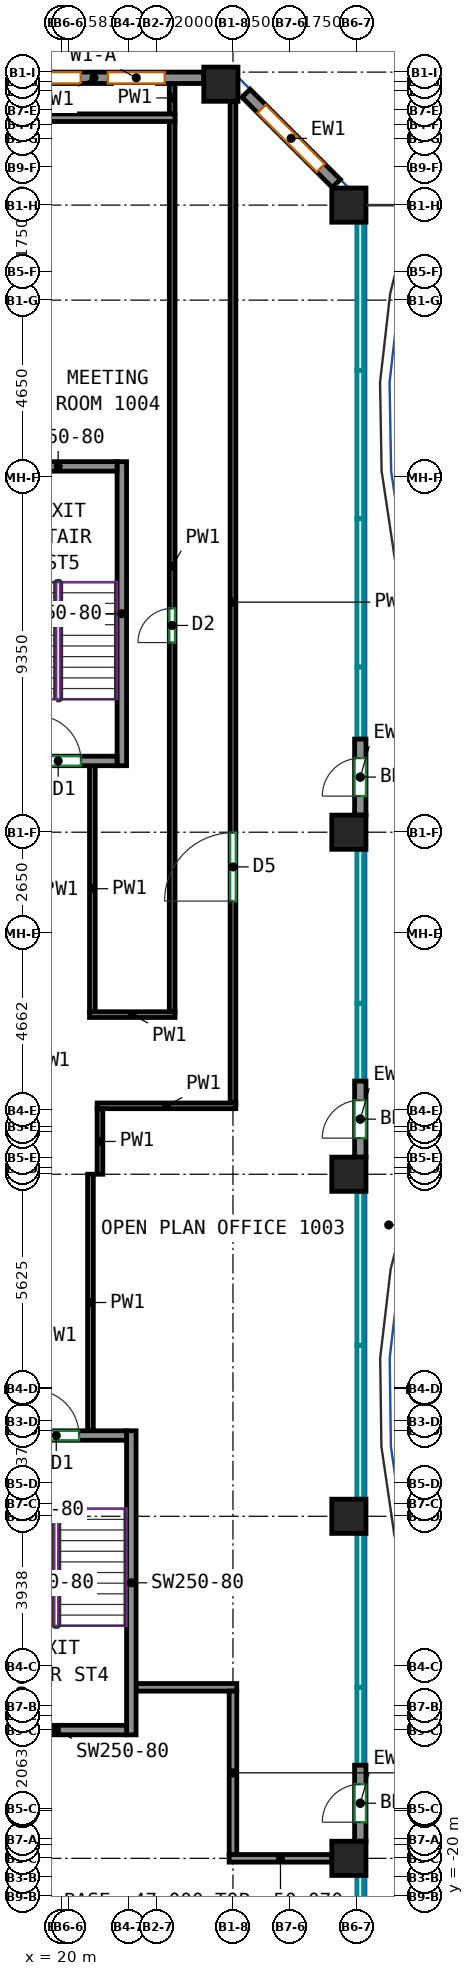
"""IFC4 building model, lengths in metres.
Left out: names, types, materials, properties, quantities, classifications, styles, units other than length and angle.
Written with IfcOpenShell. Run it as: python <this file> out.ifc"""

import sys

from ifc_helpers import new_model, si_unit, direction, frame, frame_2d, origin, origin_2d, place, context, subcontext, project, spatial, rectangle, extrude, source, transform, mapped, element, fill, save


model = new_model("IFC4")
c1 = context("Model", 3, precision=1e-05, world=origin(), true_north=direction((0.0, 1.0)))
c2 = subcontext(c1, "Body", "Model", "MODEL_VIEW")
j1 = project(units=[si_unit("LENGTHUNIT", "METRE"), si_unit("PLANEANGLEUNIT", "RADIAN")], contexts=[c1])
p1 = place(None, origin())
s1 = spatial("IfcSite", under=j1, at=p1, CompositionType="ELEMENT")
p2 = place(p1, origin())
s2 = spatial("IfcBuilding", under=s1, at=p2, CompositionType="ELEMENT")
p3 = place(p2, frame((0.0, 0.0, 47.0)))
s3 = spatial("IfcBuildingStorey", under=s2, at=p3, CompositionType="ELEMENT", Elevation=47.0)
m1 = source(origin(), c2, "Body", "SweptSolid", [
    extrude(rectangle(XDim=0.9, YDim=0.9, at=origin_2d()), origin(), (0.0, 0.0, 1.0), 3.72),
])
for number, where, z_axis, x_axis in (
    (1, (24.182, 27.682, 0.0), (0.0, 0.0, 1.0), (1.0, 0.0, 0.0)),
    (2, (27.55, -19.0, 0.0), (0.0, 0.0, 1.0), (1.0, 0.0, 0.0)),
    (3, (27.55, -10.0, 0.0), (0.0, 0.0, 1.0), (1.0, 0.0, 0.0)),
    (4, (27.55, -1.0, 0.0), (0.0, 0.0, 1.0), (1.0, 0.0, 0.0)),
    (5, (27.55, 8.0, 0.0), (0.0, 0.0, 1.0), (1.0, 0.0, 0.0)),
    (6, (27.55, 24.5, 0.0), (0.0, 0.0, 1.0), (1.0, 0.0, 0.0)),
):
    element("IfcColumn", number, at=place(p3, frame(where, z_axis=z_axis, x_axis=x_axis)), inside=s3, PredefinedType="COLUMN", context=c2, shape_type="MappedRepresentation", body=[
        mapped(m1, transform((0.0, 0.0, 0.0))),
    ])
m2 = source(origin(), c2, "Body", "SweptSolid", [
    extrude(rectangle(XDim=8.0, YDim=0.25, at=frame_2d((4.0, 0.0))), origin(), (0.0, 0.0, 1.0), 3.72),
])
p4 = place(p3, frame((21.825, -15.75, 0.0), z_axis=(0.0, 0.0, 1.0), x_axis=(0.0, 1.0, 0.0)))
e7 = element("IfcWall", 7, at=p4, inside=s3, PredefinedType="SHEAR", context=c2, shape_type="MappedRepresentation", body=[
    mapped(m2, transform((0.0, 0.0, 0.0))),
])
m3 = source(origin(), c2, "Body", "SweptSolid", [
    extrude(rectangle(XDim=3.7, YDim=0.25, at=frame_2d((1.85, 0.0))), origin(), (0.0, 0.0, 1.0), 3.72),
])
p5 = place(p3, frame((18.0, -15.625, 0.0), z_axis=(0.0, 0.0, 1.0), x_axis=(1.0, 0.0, 0.0)))
e8 = element("IfcWall", 8, at=p5, inside=s3, PredefinedType="SHEAR", context=c2, shape_type="MappedRepresentation", body=[
    mapped(m3, transform((0.0, 0.0, 0.0))),
])
p6 = place(p3, frame((18.0, -7.875, 0.0), z_axis=(0.0, 0.0, 1.0), x_axis=(1.0, 0.0, 0.0)))
e9 = element("IfcWall", 9, at=p6, inside=s3, PredefinedType="SHEAR", context=c2, shape_type="MappedRepresentation", body=[
    mapped(m3, transform((0.0, 0.0, 0.0))),
])
p7 = place(p6, frame((1.25, 0.0, 0.0)))
e10 = element("IfcOpeningElement", 10, at=p7, cuts=e9, PredefinedType="OPENING", context=c2, shape_type="SweptSolid", body=[
    extrude(rectangle(XDim=1.2, YDim=2.1, at=frame_2d((0.6, 1.05))), frame((0.0, 0.135, 0.0), z_axis=(0.0, -1.0, 0.0), x_axis=(1.0, 0.0, 0.0)), (0.0, 0.0, 1.0), 0.27),
])
p8 = place(p3, frame((21.575, 9.75, 0.0), z_axis=(0.0, 0.0, 1.0), x_axis=(0.0, 1.0, 0.0)))
e11 = element("IfcWall", 11, at=p8, inside=s3, PredefinedType="SHEAR", context=c2, shape_type="MappedRepresentation", body=[
    mapped(m2, transform((0.0, 0.0, 0.0))),
])
m4 = source(origin(), c2, "Body", "SweptSolid", [
    extrude(rectangle(XDim=3.1, YDim=0.25, at=frame_2d((1.55, 0.0))), origin(), (0.0, 0.0, 1.0), 3.72),
])
p9 = place(p3, frame((18.35, 9.875, 0.0), z_axis=(0.0, 0.0, 1.0), x_axis=(1.0, 0.0, 0.0)))
e12 = element("IfcWall", 12, at=p9, inside=s3, PredefinedType="SHEAR", context=c2, shape_type="MappedRepresentation", body=[
    mapped(m4, transform((0.0, 0.0, 0.0))),
])
p10 = place(p9, frame((0.95, 0.0, 0.0)))
e13 = element("IfcOpeningElement", 13, at=p10, cuts=e12, PredefinedType="OPENING", context=c2, shape_type="SweptSolid", body=[
    extrude(rectangle(XDim=1.2, YDim=2.1, at=frame_2d((0.6, 1.05))), frame((0.0, 0.135, 0.0), z_axis=(0.0, -1.0, 0.0), x_axis=(1.0, 0.0, 0.0)), (0.0, 0.0, 1.0), 0.27),
])
p11 = place(p3, frame((18.35, 17.625, 0.0), z_axis=(0.0, 0.0, 1.0), x_axis=(1.0, 0.0, 0.0)))
e14 = element("IfcWall", 14, at=p11, inside=s3, PredefinedType="SHEAR", context=c2, shape_type="MappedRepresentation", body=[
    mapped(m4, transform((0.0, 0.0, 0.0))),
])
m5 = source(origin(), c2, "Body", "SweptSolid", [
    extrude(rectangle(XDim=2.0, YDim=0.3, at=frame_2d((1.0, 0.0))), origin(), (0.0, 0.0, 1.0), 3.72),
])
p12 = place(p3, frame((27.85, -18.55, 0.0), z_axis=(0.0, 0.0, 1.0), x_axis=(0.0, 1.0, 0.0)))
e15 = element("IfcWall", 15, at=p12, inside=s3, PredefinedType="SOLIDWALL", context=c2, shape_type="MappedRepresentation", body=[
    mapped(m5, transform((0.0, 0.0, 0.0))),
])
p13 = place(p12, frame((0.5, 0.0, 0.0)))
e16 = element("IfcOpeningElement", 16, at=p13, cuts=e15, PredefinedType="OPENING", context=c2, shape_type="SweptSolid", body=[
    extrude(rectangle(XDim=1.0, YDim=2.1, at=frame_2d((0.5, 1.05))), frame((0.0, 0.16, 0.0), z_axis=(0.0, -1.0, 0.0), x_axis=(1.0, 0.0, 0.0)), (0.0, 0.0, 1.0), 0.32),
])
p14 = place(p3, frame((27.85, -0.55, 0.0), z_axis=(0.0, 0.0, 1.0), x_axis=(0.0, 1.0, 0.0)))
e17 = element("IfcWall", 17, at=p14, inside=s3, PredefinedType="SOLIDWALL", context=c2, shape_type="MappedRepresentation", body=[
    mapped(m5, transform((0.0, 0.0, 0.0))),
])
p15 = place(p14, frame((0.5, 0.0, 0.0)))
e18 = element("IfcOpeningElement", 18, at=p15, cuts=e17, PredefinedType="OPENING", context=c2, shape_type="SweptSolid", body=[
    extrude(rectangle(XDim=1.0, YDim=2.1, at=frame_2d((0.5, 1.05))), frame((0.0, 0.16, 0.0), z_axis=(0.0, -1.0, 0.0), x_axis=(1.0, 0.0, 0.0)), (0.0, 0.0, 1.0), 0.32),
])
p16 = place(p3, frame((27.85, 8.45, 0.0), z_axis=(0.0, 0.0, 1.0), x_axis=(0.0, 1.0, 0.0)))
e19 = element("IfcWall", 19, at=p16, inside=s3, PredefinedType="SOLIDWALL", context=c2, shape_type="MappedRepresentation", body=[
    mapped(m5, transform((0.0, 0.0, 0.0))),
])
p17 = place(p16, frame((0.5, 0.0, 0.0)))
e20 = element("IfcOpeningElement", 20, at=p17, cuts=e19, PredefinedType="OPENING", context=c2, shape_type="SweptSolid", body=[
    extrude(rectangle(XDim=1.0, YDim=2.1, at=frame_2d((0.5, 1.05))), frame((0.0, 0.16, 0.0), z_axis=(0.0, -1.0, 0.0), x_axis=(1.0, 0.0, 0.0)), (0.0, 0.0, 1.0), 0.32),
])
m6 = source(origin(), c2, "Body", "SweptSolid", [
    extrude(rectangle(XDim=3.359, YDim=0.3, at=frame_2d((1.679, 0.0))), origin(), (0.0, 0.0, 1.0), 3.72),
])
p18 = place(p3, frame((27.219, 25.069, 0.0), z_axis=(0.0, 0.0, 1.0), x_axis=(-0.707070438228, 0.707143122278, 0.0)))
e21 = element("IfcWall", 21, at=p18, inside=s3, PredefinedType="SOLIDWALL", context=c2, shape_type="MappedRepresentation", body=[
    mapped(m6, transform((0.0, 0.0, 0.0))),
])
p19 = place(p18, frame((0.579, 0.0, 0.7)))
e22 = element("IfcOpeningElement", 22, at=p19, cuts=e21, PredefinedType="OPENING", context=c2, shape_type="SweptSolid", body=[
    extrude(rectangle(XDim=2.2, YDim=2.25, at=frame_2d((1.1, 1.125))), frame((0.0, 0.16, 0.0), z_axis=(0.0, -1.0, 0.0), x_axis=(1.0, 0.0, 0.0)), (0.0, 0.0, 1.0), 0.32),
])
m7 = source(origin(), c2, "Body", "SweptSolid", [
    extrude(rectangle(XDim=5.782, YDim=0.3, at=frame_2d((2.891, 0.0))), origin(), (0.0, 0.0, 1.0), 3.72),
])
p20 = place(p3, frame((23.732, 27.85, 0.0), z_axis=(0.0, 0.0, 1.0), x_axis=(-1.0, 0.0, 0.0)))
e23 = element("IfcWall", 23, at=p20, inside=s3, PredefinedType="SOLIDWALL", context=c2, shape_type="MappedRepresentation", body=[
    mapped(m7, transform((0.0, 0.0, 0.0))),
])
p21 = place(p20, frame((1.026, 0.0, 0.7)))
e24 = element("IfcOpeningElement", 24, at=p21, cuts=e23, PredefinedType="OPENING", context=c2, shape_type="SweptSolid", body=[
    extrude(rectangle(XDim=1.5, YDim=2.25, at=frame_2d((0.75, 1.125))), frame((0.0, 0.16, 0.0), z_axis=(0.0, -1.0, 0.0), x_axis=(1.0, 0.0, 0.0)), (0.0, 0.0, 1.0), 0.32),
])
p22 = place(p20, frame((3.236, 0.0, 0.7)))
e25 = element("IfcOpeningElement", 25, at=p22, cuts=e23, PredefinedType="OPENING", context=c2, shape_type="SweptSolid", body=[
    extrude(rectangle(XDim=2.2, YDim=2.25, at=frame_2d((1.1, 1.125))), frame((0.0, 0.16, 0.0), z_axis=(0.0, -1.0, 0.0), x_axis=(1.0, 0.0, 0.0)), (0.0, 0.0, 1.0), 0.32),
])
p23 = place(p3, frame((20.8, 3.275, 0.0), z_axis=(0.0, 0.0, 1.0), x_axis=(0.0, 1.0, 0.0)))
e26 = element("IfcWall", 26, at=p23, inside=s3, PredefinedType="PARTITIONING", context=c2, shape_type="SweptSolid", body=[
    extrude(rectangle(XDim=6.475, YDim=0.15, at=frame_2d((3.238, 0.0))), origin(), (0.0, 0.0, 1.0), 3.72),
])
p24 = place(p3, frame((20.725, 3.2, 0.0), z_axis=(0.0, 0.0, 1.0), x_axis=(1.0, 0.0, 0.0)))
e27 = element("IfcWall", 27, at=p24, inside=s3, PredefinedType="PARTITIONING", context=c2, shape_type="SweptSolid", body=[
    extrude(rectangle(XDim=2.25, YDim=0.15, at=frame_2d((1.125, 0.0))), origin(), (0.0, 0.0, 1.0), 3.72),
])
p25 = place(p3, frame((22.9, 3.275, 0.0), z_axis=(0.0, 0.0, 1.0), x_axis=(0.0, 1.0, 0.0)))
e28 = element("IfcWall", 28, at=p25, inside=s3, PredefinedType="PARTITIONING", context=c2, shape_type="SweptSolid", body=[
    extrude(rectangle(XDim=23.435, YDim=0.15, at=frame_2d((11.718, 0.0))), origin(), (0.0, 0.0, 1.0), 3.72),
])
p26 = place(p25, frame((9.715, 0.0, 0.0)))
e29 = element("IfcOpeningElement", 29, at=p26, cuts=e28, PredefinedType="OPENING", context=c2, shape_type="SweptSolid", body=[
    extrude(rectangle(XDim=0.9, YDim=2.1, at=frame_2d((0.45, 1.05))), frame((0.0, 0.085, 0.0), z_axis=(0.0, -1.0, 0.0), x_axis=(1.0, 0.0, 0.0)), (0.0, 0.0, 1.0), 0.17),
])
p27 = place(p3, frame((24.5, 0.875, 0.0), z_axis=(0.0, 0.0, 1.0), x_axis=(0.0, 1.0, 0.0)))
e30 = element("IfcWall", 30, at=p27, inside=s3, PredefinedType="PARTITIONING", context=c2, shape_type="SweptSolid", body=[
    extrude(rectangle(XDim=26.357, YDim=0.15, at=frame_2d((13.178, 0.0))), origin(), (0.0, 0.0, 1.0), 3.07),
])
p28 = place(p27, frame((5.312, 0.0, 0.0)))
e31 = element("IfcOpeningElement", 31, at=p28, cuts=e30, PredefinedType="OPENING", context=c2, shape_type="SweptSolid", body=[
    extrude(rectangle(XDim=1.8, YDim=2.1, at=frame_2d((0.9, 1.05))), frame((0.0, 0.085, 0.0), z_axis=(0.0, -1.0, 0.0), x_axis=(1.0, 0.0, 0.0)), (0.0, 0.0, 1.0), 0.17),
])
p29 = place(p3, frame((20.925, 0.8, 0.0), z_axis=(0.0, 0.0, 1.0), x_axis=(1.0, 0.0, 0.0)))
e32 = element("IfcWall", 32, at=p29, inside=s3, PredefinedType="PARTITIONING", context=c2, shape_type="SweptSolid", body=[
    extrude(rectangle(XDim=3.65, YDim=0.15, at=frame_2d((1.825, 0.0))), origin(), (0.0, 0.0, 1.0), 3.72),
])
p30 = place(p3, frame((21.0, -1.0, 0.0), z_axis=(0.0, 0.0, 1.0), x_axis=(0.0, 1.0, 0.0)))
e33 = element("IfcWall", 33, at=p30, inside=s3, PredefinedType="PARTITIONING", context=c2, shape_type="SweptSolid", body=[
    extrude(rectangle(XDim=1.725, YDim=0.15, at=frame_2d((0.863, 0.0))), origin(), (0.0, 0.0, 1.0), 3.72),
])
p31 = place(p3, frame((20.75, -7.75, 0.0), z_axis=(0.0, 0.0, 1.0), x_axis=(0.0, 1.0, 0.0)))
e34 = element("IfcWall", 34, at=p31, inside=s3, PredefinedType="PARTITIONING", context=c2, shape_type="SweptSolid", body=[
    extrude(rectangle(XDim=6.75, YDim=0.15, at=frame_2d((3.375, 0.0))), origin(), (0.0, 0.0, 1.0), 3.72),
])
p32 = place(p3, frame((22.9, 26.891, 0.0), z_axis=(0.0, 0.0, 1.0), x_axis=(0.0, 1.0, 0.0)))
e35 = element("IfcWall", 35, at=p32, inside=s3, PredefinedType="PARTITIONING", context=c2, shape_type="SweptSolid", body=[
    extrude(rectangle(XDim=0.859, YDim=0.15, at=frame_2d((0.429, 0.0))), origin(), (0.0, 0.0, 1.0), 3.72),
])
p33 = place(p3, frame((-20.874, 26.8, 0.0), z_axis=(0.0, 0.0, 1.0), x_axis=(1.0, 0.0, 0.0)))
e36 = element("IfcWall", 36, at=p33, inside=s3, PredefinedType="PARTITIONING", context=c2, shape_type="SweptSolid", body=[
    extrude(rectangle(XDim=43.848, YDim=0.2, at=frame_2d((21.924, 0.0))), origin(), (0.0, 0.0, 1.0), 3.72),
])
p34 = place(p33, frame((33.867, 0.0, 0.0)))
e37 = element("IfcOpeningElement", 37, at=p34, cuts=e36, PredefinedType="OPENING", context=c2, shape_type="SweptSolid", body=[
    extrude(rectangle(XDim=1.0, YDim=2.1, at=frame_2d((0.5, 1.05))), frame((0.0, 0.11, 0.0), z_axis=(0.0, -1.0, 0.0), x_axis=(1.0, 0.0, 0.0)), (0.0, 0.0, 1.0), 0.22),
])
p35 = place(p3, frame((24.6, -14.5, 0.0), z_axis=(0.0, 0.0, 1.0), x_axis=(-1.0, 0.0, 0.0)))
e38 = element("IfcWall", 38, at=p35, inside=s3, PredefinedType="PARTITIONING", context=c2, shape_type="SweptSolid", body=[
    extrude(rectangle(XDim=2.65, YDim=0.2, at=frame_2d((1.325, 0.0))), origin(), (0.0, 0.0, 1.0), 3.72),
])
p36 = place(p3, frame((24.5, -18.9, 0.0), z_axis=(0.0, 0.0, 1.0), x_axis=(0.0, 1.0, 0.0)))
e39 = element("IfcWall", 39, at=p36, inside=s3, PredefinedType="PARTITIONING", context=c2, shape_type="SweptSolid", body=[
    extrude(rectangle(XDim=4.3, YDim=0.2, at=frame_2d((2.15, 0.0))), origin(), (0.0, 0.0, 1.0), 3.07),
])
p37 = place(p3, frame((27.1, -19.0, 0.0), z_axis=(0.0, 0.0, 1.0), x_axis=(-1.0, 0.0, 0.0)))
e40 = element("IfcWall", 40, at=p37, inside=s3, PredefinedType="PARTITIONING", context=c2, shape_type="SweptSolid", body=[
    extrude(rectangle(XDim=2.7, YDim=0.2, at=frame_2d((1.35, 0.0))), origin(), (0.0, 0.0, 1.0), 3.07),
])
p38 = place(p13, origin())
e41 = element("IfcDoor", 41, at=p38, inside=s3, OperationType="SINGLE_SWING_LEFT", PredefinedType="DOOR", context=c2, shape_type="SweptSolid", body=[
    extrude(rectangle(XDim=1.0, YDim=2.1, at=frame_2d((0.5, 1.05))), frame((0.0, 0.025, 0.0), z_axis=(0.0, -1.0, 0.0), x_axis=(1.0, 0.0, 0.0)), (0.0, 0.0, 1.0), 0.05),
])
fill(e16, e41)
p39 = place(p15, origin())
e42 = element("IfcDoor", 42, at=p39, inside=s3, OperationType="SINGLE_SWING_LEFT", PredefinedType="DOOR", context=c2, shape_type="SweptSolid", body=[
    extrude(rectangle(XDim=1.0, YDim=2.1, at=frame_2d((0.5, 1.05))), frame((0.0, 0.025, 0.0), z_axis=(0.0, -1.0, 0.0), x_axis=(1.0, 0.0, 0.0)), (0.0, 0.0, 1.0), 0.05),
])
fill(e18, e42)
p40 = place(p17, origin())
e43 = element("IfcDoor", 43, at=p40, inside=s3, OperationType="SINGLE_SWING_LEFT", PredefinedType="DOOR", context=c2, shape_type="SweptSolid", body=[
    extrude(rectangle(XDim=1.0, YDim=2.1, at=frame_2d((0.5, 1.05))), frame((0.0, 0.025, 0.0), z_axis=(0.0, -1.0, 0.0), x_axis=(1.0, 0.0, 0.0)), (0.0, 0.0, 1.0), 0.05),
])
fill(e20, e43)
p41 = place(p19, origin())
e44 = element("IfcWindow", 44, at=p41, inside=s3, PartitioningType="SINGLE_PANEL", PredefinedType="WINDOW", context=c2, shape_type="SweptSolid", body=[
    extrude(rectangle(XDim=2.2, YDim=2.25, at=frame_2d((1.1, 1.125))), frame((0.0, 0.03, 0.0), z_axis=(0.0, -1.0, 0.0), x_axis=(1.0, 0.0, 0.0)), (0.0, 0.0, 1.0), 0.06),
])
fill(e22, e44)
p42 = place(p21, origin())
e45 = element("IfcWindow", 45, at=p42, inside=s3, PartitioningType="SINGLE_PANEL", PredefinedType="WINDOW", context=c2, shape_type="SweptSolid", body=[
    extrude(rectangle(XDim=1.5, YDim=2.25, at=frame_2d((0.75, 1.125))), frame((0.0, 0.03, 0.0), z_axis=(0.0, -1.0, 0.0), x_axis=(1.0, 0.0, 0.0)), (0.0, 0.0, 1.0), 0.06),
])
fill(e24, e45)
p43 = place(p22, origin())
e46 = element("IfcWindow", 46, at=p43, inside=s3, PartitioningType="SINGLE_PANEL", PredefinedType="WINDOW", context=c2, shape_type="SweptSolid", body=[
    extrude(rectangle(XDim=2.2, YDim=2.25, at=frame_2d((1.1, 1.125))), frame((0.0, 0.03, 0.0), z_axis=(0.0, -1.0, 0.0), x_axis=(1.0, 0.0, 0.0)), (0.0, 0.0, 1.0), 0.06),
])
fill(e25, e46)
p44 = place(p7, origin())
e47 = element("IfcDoor", 47, at=p44, inside=s3, OperationType="DOUBLE_DOOR_SINGLE_SWING", PredefinedType="DOOR", context=c2, shape_type="SweptSolid", body=[
    extrude(rectangle(XDim=1.2, YDim=2.1, at=frame_2d((0.6, 1.05))), frame((0.0, 0.025, 0.0), z_axis=(0.0, -1.0, 0.0), x_axis=(1.0, 0.0, 0.0)), (0.0, 0.0, 1.0), 0.05),
])
fill(e10, e47)
p45 = place(p10, origin())
e48 = element("IfcDoor", 48, at=p45, inside=s3, OperationType="DOUBLE_DOOR_SINGLE_SWING", PredefinedType="DOOR", context=c2, shape_type="SweptSolid", body=[
    extrude(rectangle(XDim=1.2, YDim=2.1, at=frame_2d((0.6, 1.05))), frame((0.0, 0.025, 0.0), z_axis=(0.0, -1.0, 0.0), x_axis=(1.0, 0.0, 0.0)), (0.0, 0.0, 1.0), 0.05),
])
fill(e13, e48)
p46 = place(p28, origin())
e49 = element("IfcDoor", 49, at=p46, inside=s3, OperationType="DOUBLE_DOOR_SINGLE_SWING", PredefinedType="DOOR", context=c2, shape_type="SweptSolid", body=[
    extrude(rectangle(XDim=1.8, YDim=2.1, at=frame_2d((0.9, 1.05))), frame((0.0, 0.025, 0.0), z_axis=(0.0, -1.0, 0.0), x_axis=(1.0, 0.0, 0.0)), (0.0, 0.0, 1.0), 0.05),
])
fill(e31, e49)
p47 = place(p26, origin())
e50 = element("IfcDoor", 50, at=p47, inside=s3, OperationType="SINGLE_SWING_LEFT", PredefinedType="DOOR", context=c2, shape_type="SweptSolid", body=[
    extrude(rectangle(XDim=0.9, YDim=2.1, at=frame_2d((0.45, 1.05))), frame((0.0, 0.025, 0.0), z_axis=(0.0, -1.0, 0.0), x_axis=(1.0, 0.0, 0.0)), (0.0, 0.0, 1.0), 0.05),
])
fill(e29, e50)
save(model, sys.argv[1])
